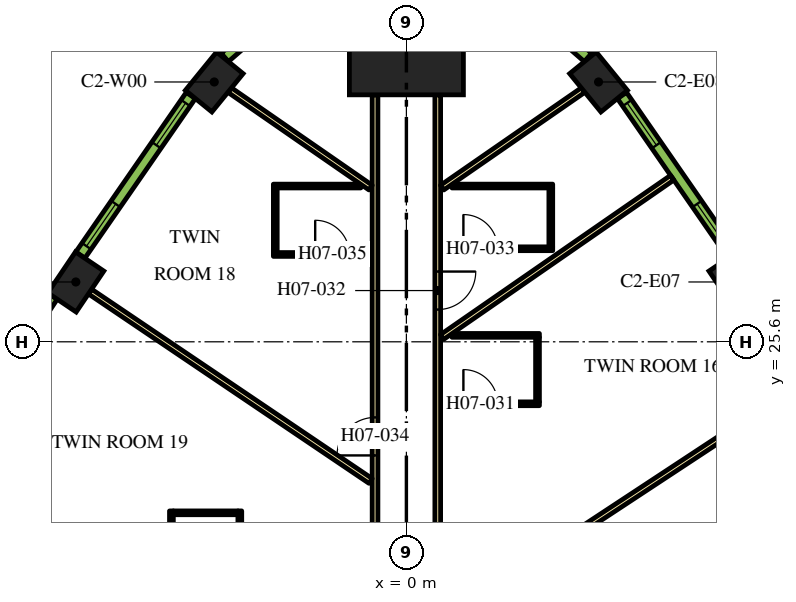
"""IFC4 building model, lengths in metres.
Left out: names, types, materials, properties, quantities, classifications, styles, units other than length and angle.
Written with IfcOpenShell. Run it as: python <this file> out.ifc"""

import sys

from ifc_helpers import new_model, si_unit, direction, frame, frame_2d, origin, origin_2d, place, context, subcontext, project, spatial, rectangle, extrude, element, fill, save


model = new_model("IFC4")
c1 = context("Model", 3, precision=1e-05, world=origin(), true_north=direction((0.0, 1.0)))
c2 = subcontext(c1, "Body", "Model", "MODEL_VIEW")
j1 = project(units=[si_unit("LENGTHUNIT", "METRE"), si_unit("PLANEANGLEUNIT", "RADIAN")], contexts=[c1])
p1 = place(None, origin())
s1 = spatial("IfcSite", under=j1, at=p1, CompositionType="ELEMENT")
p2 = place(p1, origin())
s2 = spatial("IfcBuilding", under=s1, at=p2, CompositionType="ELEMENT")
p3 = place(p2, frame((0.0, 0.0, 95.4)))
s3 = spatial("IfcBuildingStorey", under=s2, at=p3, CompositionType="ELEMENT", Elevation=95.4)
p4 = place(p3, frame((0.0, 33.598, 0.0), z_axis=(0.0, 0.0, 1.0), x_axis=(0.0, 1.0, 0.0)))
e1 = element("IfcColumn", 1, at=p4, inside=s3, PredefinedType="COLUMN", context=c2, shape_type="SweptSolid", body=[
    extrude(rectangle(XDim=3.0, YDim=3.0, at=origin_2d()), origin(), (0.0, 0.0, 1.0), 3.9),
])
for number, where, z_axis, x_axis in (
    (2, (8.699, 27.174, 0.0), (0.0, 0.0, 1.0), (-0.559, 0.829, 0.0)),
    (3, (5.056, 32.437, 0.0), (0.0, 0.0, 1.0), (-0.632, 0.775, 0.0)),
    (4, (-5.056, 32.437, 0.0), (0.0, 0.0, 1.0), (-0.632, -0.775, 0.0)),
    (5, (-8.699, 27.174, 0.0), (0.0, 0.0, 1.0), (-0.559, -0.829, 0.0)),
):
    element("IfcColumn", number, at=place(p3, frame(where, z_axis=z_axis, x_axis=x_axis)), inside=s3, PredefinedType="COLUMN", context=c2, shape_type="SweptSolid", body=[
        extrude(rectangle(XDim=1.3, YDim=0.9, at=origin_2d()), origin(), (0.0, 0.0, 1.0), 3.9),
    ])
p5 = place(p3, frame((0.825, 32.098, 0.0), z_axis=(0.0, 0.0, 1.0), x_axis=(0.0, -1.0, 0.0)))
e6 = element("IfcWall", 6, at=p5, inside=s3, PredefinedType="PARTITIONING", context=c2, shape_type="SweptSolid", body=[
    extrude(rectangle(XDim=13.543, YDim=0.15, at=frame_2d((6.772, 0.0))), origin(), (0.0, 0.0, 1.0), 2.75),
])
p6 = place(p5, frame((12.213, 0.0, 0.0)))
e7 = element("IfcOpeningElement", 7, at=p6, cuts=e6, PredefinedType="OPENING", context=c2, shape_type="SweptSolid", body=[
    extrude(rectangle(XDim=1.0, YDim=2.1, at=frame_2d((0.5, 1.05))), frame((0.0, 0.085, 0.0), z_axis=(0.0, -1.0, 0.0), x_axis=(1.0, 0.0, 0.0)), (0.0, 0.0, 1.0), 0.17),
])
p7 = place(p5, frame((4.65, 0.0, 0.0)))
e8 = element("IfcOpeningElement", 8, at=p7, cuts=e6, PredefinedType="OPENING", context=c2, shape_type="SweptSolid", body=[
    extrude(rectangle(XDim=1.0, YDim=2.1, at=frame_2d((0.5, 1.05))), frame((0.0, 0.085, 0.0), z_axis=(0.0, -1.0, 0.0), x_axis=(1.0, 0.0, 0.0)), (0.0, 0.0, 1.0), 0.17),
])
p8 = place(p3, frame((-0.825, 18.475, 0.0), z_axis=(0.0, 0.0, 1.0), x_axis=(0.0, 1.0, 0.0)))
e9 = element("IfcWall", 9, at=p8, inside=s3, PredefinedType="PARTITIONING", context=c2, shape_type="SweptSolid", body=[
    extrude(rectangle(XDim=13.623, YDim=0.15, at=frame_2d((6.812, 0.0))), origin(), (0.0, 0.0, 1.0), 2.75),
])
p9 = place(p8, frame((4.135, 0.0, 0.0)))
e10 = element("IfcOpeningElement", 10, at=p9, cuts=e9, PredefinedType="OPENING", context=c2, shape_type="SweptSolid", body=[
    extrude(rectangle(XDim=1.0, YDim=2.1, at=frame_2d((0.5, 1.05))), frame((0.0, 0.085, 0.0), z_axis=(0.0, -1.0, 0.0), x_axis=(1.0, 0.0, 0.0)), (0.0, 0.0, 1.0), 0.17),
])
p10 = place(p3, frame((-11.838, 21.585, 0.0), z_axis=(0.0, 0.0, 1.0), x_axis=(0.841699322813, -0.539946525108, 0.0)))
e11 = element("IfcWall", 11, at=p10, inside=s3, PredefinedType="PARTITIONING", context=c2, shape_type="SweptSolid", body=[
    extrude(rectangle(XDim=6.392, YDim=0.15, at=frame_2d((3.196, 0.0))), origin(), (0.0, 0.0, 1.0), 2.75),
])
p11 = place(p3, frame((-8.326, 26.923, 0.0), z_axis=(0.0, 0.0, 1.0), x_axis=(0.828836601893, -0.5594907393, 0.0)))
e12 = element("IfcWall", 12, at=p11, inside=s3, PredefinedType="PARTITIONING", context=c2, shape_type="SweptSolid", body=[
    extrude(rectangle(XDim=8.909, YDim=0.15, at=frame_2d((4.455, 0.0))), origin(), (0.0, 0.0, 1.0), 2.75),
])
p12 = place(p3, frame((-4.649, 32.223, 0.0), z_axis=(0.0, 0.0, 1.0), x_axis=(0.822262349475, -0.569108626394, 0.0)))
e13 = element("IfcWall", 13, at=p12, inside=s3, PredefinedType="PARTITIONING", context=c2, shape_type="SweptSolid", body=[
    extrude(rectangle(XDim=4.51, YDim=0.15, at=frame_2d((2.255, 0.0))), origin(), (0.0, 0.0, 1.0), 2.75),
])
p13 = place(p3, frame((6.994, 29.917, 0.0), z_axis=(0.0, 0.0, 1.0), x_axis=(-0.822255462494, -0.569118576747, 0.0)))
e14 = element("IfcWall", 14, at=p13, inside=s3, PredefinedType="PARTITIONING", context=c2, shape_type="SweptSolid", body=[
    extrude(rectangle(XDim=7.362, YDim=0.15, at=frame_2d((3.681, 0.0))), origin(), (0.0, 0.0, 1.0), 2.75),
])
p14 = place(p3, frame((10.592, 24.589, 0.0), z_axis=(0.0, 0.0, 1.0), x_axis=(-0.835337323748, -0.549737715236, 0.0)))
e15 = element("IfcWall", 15, at=p14, inside=s3, PredefinedType="PARTITIONING", context=c2, shape_type="SweptSolid", body=[
    extrude(rectangle(XDim=10.875, YDim=0.15, at=frame_2d((5.438, 0.0))), origin(), (0.0, 0.0, 1.0), 2.75),
])
p15 = place(p3, frame((4.649, 32.223, 0.0), z_axis=(0.0, 0.0, 1.0), x_axis=(-0.822262349475, -0.569108626394, 0.0)))
e16 = element("IfcWall", 16, at=p15, inside=s3, PredefinedType="PARTITIONING", context=c2, shape_type="SweptSolid", body=[
    extrude(rectangle(XDim=4.51, YDim=0.15, at=frame_2d((2.255, 0.0))), origin(), (0.0, 0.0, 1.0), 2.75),
])
p16 = place(p3, frame((0.9, 23.969, 0.0), z_axis=(0.0, 0.0, 1.0), x_axis=(1.0, 0.0, 0.0)))
e17 = element("IfcWall", 17, at=p16, inside=s3, PredefinedType="PARTITIONING", context=c2, shape_type="SweptSolid", body=[
    extrude(rectangle(XDim=2.6, YDim=0.1, at=frame_2d((1.3, 0.0))), origin(), (0.0, 0.0, 1.0), 2.75),
])
p17 = place(p16, frame((0.6, 0.0, 0.0)))
e18 = element("IfcOpeningElement", 18, at=p17, cuts=e17, PredefinedType="OPENING", context=c2, shape_type="SweptSolid", body=[
    extrude(rectangle(XDim=0.9, YDim=2.1, at=frame_2d((0.45, 1.05))), frame((0.0, 0.06, 0.0), z_axis=(0.0, -1.0, 0.0), x_axis=(1.0, 0.0, 0.0)), (0.0, 0.0, 1.0), 0.12),
])
p18 = place(p3, frame((3.45, 24.019, 0.0), z_axis=(0.0, 0.0, 1.0), x_axis=(0.0, 1.0, 0.0)))
e19 = element("IfcWall", 19, at=p18, inside=s3, PredefinedType="PARTITIONING", context=c2, shape_type="SweptSolid", body=[
    extrude(rectangle(XDim=1.7, YDim=0.1, at=frame_2d((0.85, 0.0))), origin(), (0.0, 0.0, 1.0), 2.75),
])
p19 = place(p3, frame((1.2, 25.769, 0.0), z_axis=(0.0, 0.0, 1.0), x_axis=(1.0, 0.0, 0.0)))
e20 = element("IfcWall", 20, at=p19, inside=s3, PredefinedType="PARTITIONING", context=c2, shape_type="SweptSolid", body=[
    extrude(rectangle(XDim=2.3, YDim=0.1, at=frame_2d((1.15, 0.0))), origin(), (0.0, 0.0, 1.0), 2.75),
])
p20 = place(p3, frame((0.9, 28.048, 0.0), z_axis=(0.0, 0.0, 1.0), x_axis=(1.0, 0.0, 0.0)))
e21 = element("IfcWall", 21, at=p20, inside=s3, PredefinedType="PARTITIONING", context=c2, shape_type="SweptSolid", body=[
    extrude(rectangle(XDim=2.95, YDim=0.1, at=frame_2d((1.475, 0.0))), origin(), (0.0, 0.0, 1.0), 2.75),
])
p21 = place(p20, frame((0.6, 0.0, 0.0)))
e22 = element("IfcOpeningElement", 22, at=p21, cuts=e21, PredefinedType="OPENING", context=c2, shape_type="SweptSolid", body=[
    extrude(rectangle(XDim=0.9, YDim=2.1, at=frame_2d((0.45, 1.05))), frame((0.0, 0.06, 0.0), z_axis=(0.0, -1.0, 0.0), x_axis=(1.0, 0.0, 0.0)), (0.0, 0.0, 1.0), 0.12),
])
p22 = place(p3, frame((3.8, 28.098, 0.0), z_axis=(0.0, 0.0, 1.0), x_axis=(0.0, 1.0, 0.0)))
e23 = element("IfcWall", 23, at=p22, inside=s3, PredefinedType="PARTITIONING", context=c2, shape_type="SweptSolid", body=[
    extrude(rectangle(XDim=1.55, YDim=0.1, at=frame_2d((0.775, 0.0))), origin(), (0.0, 0.0, 1.0), 2.75),
])
p23 = place(p3, frame((1.2, 29.698, 0.0), z_axis=(0.0, 0.0, 1.0), x_axis=(1.0, 0.0, 0.0)))
e24 = element("IfcWall", 24, at=p23, inside=s3, PredefinedType="PARTITIONING", context=c2, shape_type="SweptSolid", body=[
    extrude(rectangle(XDim=2.65, YDim=0.1, at=frame_2d((1.325, 0.0))), origin(), (0.0, 0.0, 1.0), 2.75),
])
p24 = place(p3, frame((-3.5, 27.898, 0.0), z_axis=(0.0, 0.0, 1.0), x_axis=(1.0, 0.0, 0.0)))
e25 = element("IfcWall", 25, at=p24, inside=s3, PredefinedType="PARTITIONING", context=c2, shape_type="SweptSolid", body=[
    extrude(rectangle(XDim=2.6, YDim=0.1, at=frame_2d((1.3, 0.0))), origin(), (0.0, 0.0, 1.0), 2.75),
])
p25 = place(p24, frame((1.1, 0.0, 0.0)))
e26 = element("IfcOpeningElement", 26, at=p25, cuts=e25, PredefinedType="OPENING", context=c2, shape_type="SweptSolid", body=[
    extrude(rectangle(XDim=0.9, YDim=2.1, at=frame_2d((0.45, 1.05))), frame((0.0, 0.06, 0.0), z_axis=(0.0, -1.0, 0.0), x_axis=(1.0, 0.0, 0.0)), (0.0, 0.0, 1.0), 0.12),
])
p26 = place(p3, frame((-3.45, 27.948, 0.0), z_axis=(0.0, 0.0, 1.0), x_axis=(0.0, 1.0, 0.0)))
e27 = element("IfcWall", 27, at=p26, inside=s3, PredefinedType="PARTITIONING", context=c2, shape_type="SweptSolid", body=[
    extrude(rectangle(XDim=1.7, YDim=0.1, at=frame_2d((0.85, 0.0))), origin(), (0.0, 0.0, 1.0), 2.75),
])
p27 = place(p3, frame((-1.2, 29.698, 0.0), z_axis=(0.0, 0.0, 1.0), x_axis=(-1.0, 0.0, 0.0)))
e28 = element("IfcWall", 28, at=p27, inside=s3, PredefinedType="PARTITIONING", context=c2, shape_type="SweptSolid", body=[
    extrude(rectangle(XDim=2.3, YDim=0.1, at=frame_2d((1.15, 0.0))), origin(), (0.0, 0.0, 1.0), 2.75),
])
p28 = place(p3, frame((-4.383, 18.55, 0.0), z_axis=(0.0, 0.0, 1.0), x_axis=(0.0, 1.0, 0.0)))
e29 = element("IfcWall", 29, at=p28, inside=s3, PredefinedType="PARTITIONING", context=c2, shape_type="SweptSolid", body=[
    extrude(rectangle(XDim=2.6, YDim=0.1, at=frame_2d((1.3, 0.0))), origin(), (0.0, 0.0, 1.0), 2.75),
])
p29 = place(p28, frame((0.6, 0.0, 0.0)))
e30 = element("IfcOpeningElement", 30, at=p29, cuts=e29, PredefinedType="OPENING", context=c2, shape_type="SweptSolid", body=[
    extrude(rectangle(XDim=0.9, YDim=2.1, at=frame_2d((0.45, 1.05))), frame((0.0, 0.06, 0.0), z_axis=(0.0, -1.0, 0.0), x_axis=(1.0, 0.0, 0.0)), (0.0, 0.0, 1.0), 0.12),
])
p30 = place(p3, frame((-4.433, 21.1, 0.0), z_axis=(0.0, 0.0, 1.0), x_axis=(-1.0, 0.0, 0.0)))
e31 = element("IfcWall", 31, at=p30, inside=s3, PredefinedType="PARTITIONING", context=c2, shape_type="SweptSolid", body=[
    extrude(rectangle(XDim=1.7, YDim=0.1, at=frame_2d((0.85, 0.0))), origin(), (0.0, 0.0, 1.0), 2.75),
])
p31 = place(p3, frame((-6.183, 18.55, 0.0), z_axis=(0.0, 0.0, 1.0), x_axis=(0.0, 1.0, 0.0)))
e32 = element("IfcWall", 32, at=p31, inside=s3, PredefinedType="PARTITIONING", context=c2, shape_type="SweptSolid", body=[
    extrude(rectangle(XDim=2.6, YDim=0.1, at=frame_2d((1.3, 0.0))), origin(), (0.0, 0.0, 1.0), 2.75),
])
p32 = place(p3, frame((8.58, 27.882, 0.0), z_axis=(0.0, 0.0, 1.0), x_axis=(-0.569113019126, 0.822259309136, 0.0)))
e33 = element("IfcWall", 33, at=p32, inside=s3, PredefinedType="SOLIDWALL", context=c2, shape_type="SweptSolid", body=[
    extrude(rectangle(XDim=5.107, YDim=0.29, at=frame_2d((2.553, 0.0))), origin(), (0.0, 0.0, 1.0), 3.65),
])
p33 = place(p32, frame((0.285, 0.0, 0.9)))
e34 = element("IfcOpeningElement", 34, at=p33, cuts=e33, PredefinedType="OPENING", context=c2, shape_type="SweptSolid", body=[
    extrude(rectangle(XDim=1.35, YDim=2.15, at=frame_2d((0.675, 1.075))), frame((0.0, 0.155, 0.0), z_axis=(0.0, -1.0, 0.0), x_axis=(1.0, 0.0, 0.0)), (0.0, 0.0, 1.0), 0.31),
])
p34 = place(p32, frame((3.516, 0.0, 0.9)))
e35 = element("IfcOpeningElement", 35, at=p34, cuts=e33, PredefinedType="OPENING", context=c2, shape_type="SweptSolid", body=[
    extrude(rectangle(XDim=1.35, YDim=2.15, at=frame_2d((0.675, 1.075))), frame((0.0, 0.155, 0.0), z_axis=(0.0, -1.0, 0.0), x_axis=(1.0, 0.0, 0.0)), (0.0, 0.0, 1.0), 0.31),
])
p35 = place(p3, frame((4.778, 33.082, 0.0), z_axis=(0.0, 0.0, 1.0), x_axis=(-0.754882764627, 0.655859749999, 0.0)))
e36 = element("IfcWall", 36, at=p35, inside=s3, PredefinedType="SOLIDWALL", context=c2, shape_type="SweptSolid", body=[
    extrude(rectangle(XDim=1.82, YDim=0.29, at=frame_2d((0.91, 0.0))), origin(), (0.0, 0.0, 1.0), 3.65),
])
p36 = place(p35, frame((0.46, 0.0, 0.9)))
e37 = element("IfcOpeningElement", 37, at=p36, cuts=e36, PredefinedType="OPENING", context=c2, shape_type="SweptSolid", body=[
    extrude(rectangle(XDim=0.9, YDim=2.15, at=frame_2d((0.45, 1.075))), frame((0.0, 0.155, 0.0), z_axis=(0.0, -1.0, 0.0), x_axis=(1.0, 0.0, 0.0)), (0.0, 0.0, 1.0), 0.31),
])
p37 = place(p3, frame((-3.405, 34.275, 0.0), z_axis=(0.0, 0.0, 1.0), x_axis=(-0.754882764627, -0.655859749999, 0.0)))
e38 = element("IfcWall", 38, at=p37, inside=s3, PredefinedType="SOLIDWALL", context=c2, shape_type="SweptSolid", body=[
    extrude(rectangle(XDim=1.82, YDim=0.29, at=frame_2d((0.91, 0.0))), origin(), (0.0, 0.0, 1.0), 3.65),
])
p38 = place(p37, frame((0.46, 0.0, 0.9)))
e39 = element("IfcOpeningElement", 39, at=p38, cuts=e38, PredefinedType="OPENING", context=c2, shape_type="SweptSolid", body=[
    extrude(rectangle(XDim=0.9, YDim=2.15, at=frame_2d((0.45, 1.075))), frame((0.0, 0.155, 0.0), z_axis=(0.0, -1.0, 0.0), x_axis=(1.0, 0.0, 0.0)), (0.0, 0.0, 1.0), 0.31),
])
p39 = place(p3, frame((-5.673, 32.081, 0.0), z_axis=(0.0, 0.0, 1.0), x_axis=(-0.569113019126, -0.822259309136, 0.0)))
e40 = element("IfcWall", 40, at=p39, inside=s3, PredefinedType="SOLIDWALL", context=c2, shape_type="SweptSolid", body=[
    extrude(rectangle(XDim=5.107, YDim=0.29, at=frame_2d((2.553, 0.0))), origin(), (0.0, 0.0, 1.0), 3.65),
])
p40 = place(p39, frame((0.24, 0.0, 0.9)))
e41 = element("IfcOpeningElement", 41, at=p40, cuts=e40, PredefinedType="OPENING", context=c2, shape_type="SweptSolid", body=[
    extrude(rectangle(XDim=1.35, YDim=2.15, at=frame_2d((0.675, 1.075))), frame((0.0, 0.155, 0.0), z_axis=(0.0, -1.0, 0.0), x_axis=(1.0, 0.0, 0.0)), (0.0, 0.0, 1.0), 0.31),
])
p41 = place(p39, frame((3.471, 0.0, 0.9)))
e42 = element("IfcOpeningElement", 42, at=p41, cuts=e40, PredefinedType="OPENING", context=c2, shape_type="SweptSolid", body=[
    extrude(rectangle(XDim=1.35, YDim=2.15, at=frame_2d((0.675, 1.075))), frame((0.0, 0.155, 0.0), z_axis=(0.0, -1.0, 0.0), x_axis=(1.0, 0.0, 0.0)), (0.0, 0.0, 1.0), 0.31),
])
p42 = place(p3, frame((-9.311, 26.799, 0.0), z_axis=(0.0, 0.0, 1.0), x_axis=(-0.549741341923, -0.835334937005, 0.0)))
e43 = element("IfcWall", 43, at=p42, inside=s3, PredefinedType="SOLIDWALL", context=c2, shape_type="SweptSolid", body=[
    extrude(rectangle(XDim=5.1, YDim=0.29, at=frame_2d((2.55, 0.0))), origin(), (0.0, 0.0, 1.0), 3.65),
])
p43 = place(p42, frame((0.273, 0.0, 0.9)))
e44 = element("IfcOpeningElement", 44, at=p43, cuts=e43, PredefinedType="OPENING", context=c2, shape_type="SweptSolid", body=[
    extrude(rectangle(XDim=1.35, YDim=2.15, at=frame_2d((0.675, 1.075))), frame((0.0, 0.155, 0.0), z_axis=(0.0, -1.0, 0.0), x_axis=(1.0, 0.0, 0.0)), (0.0, 0.0, 1.0), 0.31),
])
p44 = place(p42, frame((3.478, 0.0, 0.9)))
e45 = element("IfcOpeningElement", 45, at=p44, cuts=e43, PredefinedType="OPENING", context=c2, shape_type="SweptSolid", body=[
    extrude(rectangle(XDim=1.35, YDim=2.15, at=frame_2d((0.675, 1.075))), frame((0.0, 0.155, 0.0), z_axis=(0.0, -1.0, 0.0), x_axis=(1.0, 0.0, 0.0)), (0.0, 0.0, 1.0), 0.31),
])
p45 = place(p17, origin())
e46 = element("IfcDoor", 46, at=p45, inside=s3, OperationType="SINGLE_SWING_LEFT", PredefinedType="DOOR", context=c2, shape_type="SweptSolid", body=[
    extrude(rectangle(XDim=0.9, YDim=2.1, at=frame_2d((0.45, 1.05))), frame((0.0, 0.025, 0.0), z_axis=(0.0, -1.0, 0.0), x_axis=(1.0, 0.0, 0.0)), (0.0, 0.0, 1.0), 0.05),
])
fill(e18, e46)
p46 = place(p7, origin())
e47 = element("IfcDoor", 47, at=p46, inside=s3, OperationType="SINGLE_SWING_RIGHT", PredefinedType="DOOR", context=c2, shape_type="SweptSolid", body=[
    extrude(rectangle(XDim=1.0, YDim=2.1, at=frame_2d((0.5, 1.05))), frame((0.0, 0.025, 0.0), z_axis=(0.0, -1.0, 0.0), x_axis=(1.0, 0.0, 0.0)), (0.0, 0.0, 1.0), 0.05),
])
fill(e8, e47)
p47 = place(p21, origin())
e48 = element("IfcDoor", 48, at=p47, inside=s3, OperationType="SINGLE_SWING_LEFT", PredefinedType="DOOR", context=c2, shape_type="SweptSolid", body=[
    extrude(rectangle(XDim=0.9, YDim=2.1, at=frame_2d((0.45, 1.05))), frame((0.0, 0.025, 0.0), z_axis=(0.0, -1.0, 0.0), x_axis=(1.0, 0.0, 0.0)), (0.0, 0.0, 1.0), 0.05),
])
fill(e22, e48)
p48 = place(p9, origin())
e49 = element("IfcDoor", 49, at=p48, inside=s3, OperationType="SINGLE_SWING_LEFT", PredefinedType="DOOR", context=c2, shape_type="SweptSolid", body=[
    extrude(rectangle(XDim=1.0, YDim=2.1, at=frame_2d((0.5, 1.05))), frame((0.0, 0.025, 0.0), z_axis=(0.0, -1.0, 0.0), x_axis=(1.0, 0.0, 0.0)), (0.0, 0.0, 1.0), 0.05),
])
fill(e10, e49)
p49 = place(p25, origin())
e50 = element("IfcDoor", 50, at=p49, inside=s3, OperationType="SINGLE_SWING_RIGHT", PredefinedType="DOOR", context=c2, shape_type="SweptSolid", body=[
    extrude(rectangle(XDim=0.9, YDim=2.1, at=frame_2d((0.45, 1.05))), frame((0.0, 0.025, 0.0), z_axis=(0.0, -1.0, 0.0), x_axis=(1.0, 0.0, 0.0)), (0.0, 0.0, 1.0), 0.05),
])
fill(e26, e50)
p50 = place(p33, origin())
e51 = element("IfcWindow", 51, at=p50, inside=s3, PartitioningType="DOUBLE_PANEL_VERTICAL", PredefinedType="WINDOW", context=c2, shape_type="SweptSolid", body=[
    extrude(rectangle(XDim=1.35, YDim=2.15, at=frame_2d((0.675, 1.075))), frame((0.0, 0.015, 0.0), z_axis=(0.0, -1.0, 0.0), x_axis=(1.0, 0.0, 0.0)), (0.0, 0.0, 1.0), 0.06),
])
fill(e34, e51)
p51 = place(p34, origin())
e52 = element("IfcWindow", 52, at=p51, inside=s3, PartitioningType="DOUBLE_PANEL_VERTICAL", PredefinedType="WINDOW", context=c2, shape_type="SweptSolid", body=[
    extrude(rectangle(XDim=1.35, YDim=2.15, at=frame_2d((0.675, 1.075))), frame((0.0, 0.015, 0.0), z_axis=(0.0, -1.0, 0.0), x_axis=(1.0, 0.0, 0.0)), (0.0, 0.0, 1.0), 0.06),
])
fill(e35, e52)
p52 = place(p40, origin())
e53 = element("IfcWindow", 53, at=p52, inside=s3, PartitioningType="DOUBLE_PANEL_VERTICAL", PredefinedType="WINDOW", context=c2, shape_type="SweptSolid", body=[
    extrude(rectangle(XDim=1.35, YDim=2.15, at=frame_2d((0.675, 1.075))), frame((0.0, 0.015, 0.0), z_axis=(0.0, -1.0, 0.0), x_axis=(1.0, 0.0, 0.0)), (0.0, 0.0, 1.0), 0.06),
])
fill(e41, e53)
p53 = place(p41, origin())
e54 = element("IfcWindow", 54, at=p53, inside=s3, PartitioningType="DOUBLE_PANEL_VERTICAL", PredefinedType="WINDOW", context=c2, shape_type="SweptSolid", body=[
    extrude(rectangle(XDim=1.35, YDim=2.15, at=frame_2d((0.675, 1.075))), frame((0.0, 0.015, 0.0), z_axis=(0.0, -1.0, 0.0), x_axis=(1.0, 0.0, 0.0)), (0.0, 0.0, 1.0), 0.06),
])
fill(e42, e54)
save(model, sys.argv[1])
